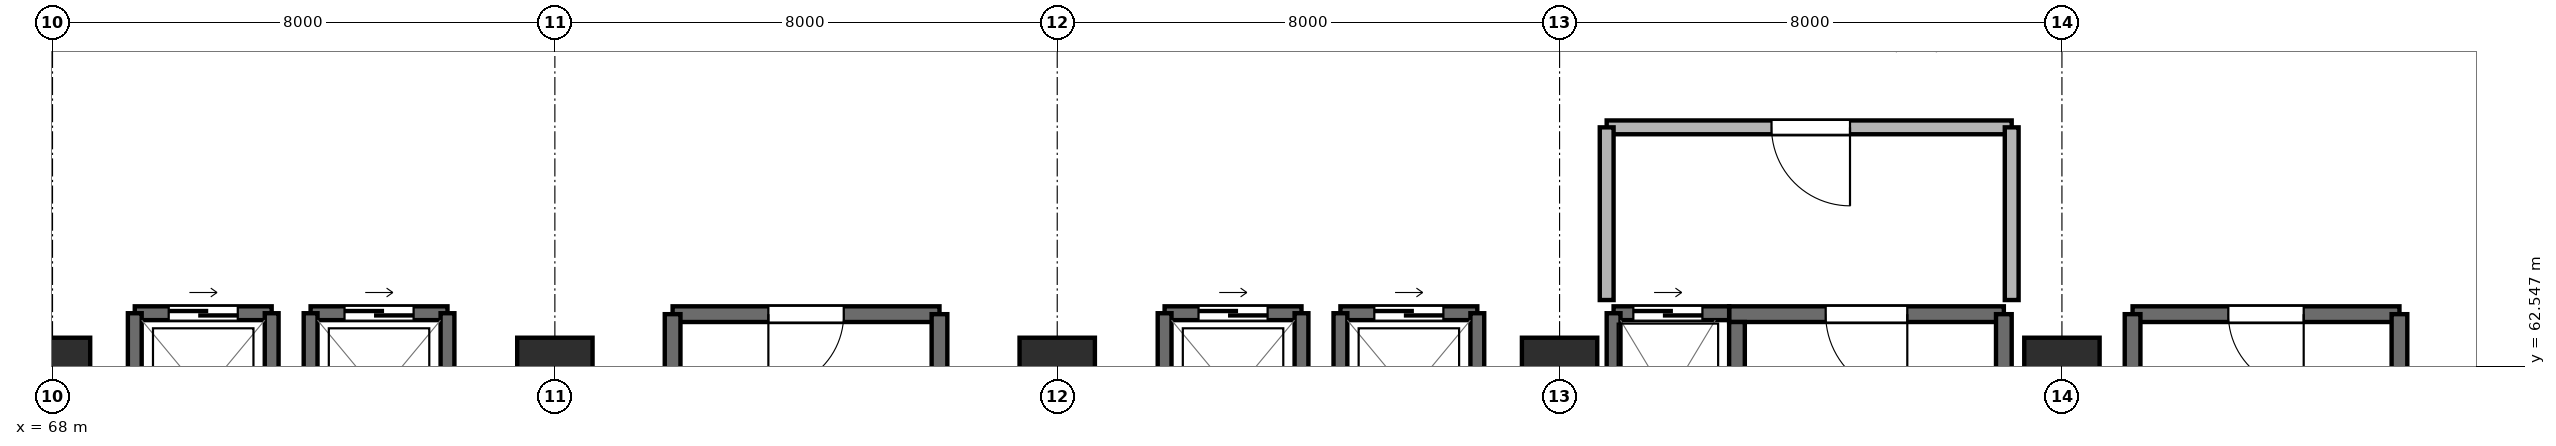
"""IFC4 building model, lengths in metres.
Left out: names, types, materials, properties, quantities, classifications, styles, units other than length and angle.
Written with IfcOpenShell. Run it as: python <this file> out.ifc"""

import sys

from ifc_helpers import new_model, si_unit, direction, frame, frame_2d, origin, origin_2d, place, context, subcontext, project, spatial, rectangle, extrude, element, fill, save


model = new_model("IFC4")
c1 = context("Model", 3, precision=1e-05, world=origin(), true_north=direction((0.0, 1.0)))
c2 = subcontext(c1, "Body", "Model", "MODEL_VIEW")
j1 = project(units=[si_unit("LENGTHUNIT", "METRE"), si_unit("PLANEANGLEUNIT", "RADIAN")], contexts=[c1])
p1 = place(None, origin())
s1 = spatial("IfcSite", under=j1, at=p1, CompositionType="ELEMENT")
p2 = place(p1, origin())
s2 = spatial("IfcBuilding", under=s1, at=p2, CompositionType="ELEMENT")
p3 = place(p2, frame((0.0, 0.0, -9.0)))
s3 = spatial("IfcBuildingStorey", under=s2, at=p3, CompositionType="ELEMENT", Elevation=-9.0)
for number, where, z_axis, x_axis in (
    (1, (68.0, 62.4, 0.0), (0.0, 0.0, 1.0), (1.0, 0.0, 0.0)),
    (2, (76.0, 62.4, 0.0), (0.0, 0.0, 1.0), (1.0, 0.0, 0.0)),
    (3, (84.0, 62.4, 0.0), (0.0, 0.0, 1.0), (1.0, 0.0, 0.0)),
    (4, (92.0, 62.4, 0.0), (0.0, 0.0, 1.0), (1.0, 0.0, 0.0)),
    (5, (100.0, 62.4, 0.0), (0.0, 0.0, 1.0), (1.0, 0.0, 0.0)),
):
    element("IfcColumn", number, at=place(p3, frame(where, z_axis=z_axis, x_axis=x_axis)), inside=s3, PredefinedType="COLUMN", context=c2, shape_type="SweptSolid", body=[
        extrude(rectangle(XDim=1.2, YDim=1.2, at=origin_2d()), origin(), (0.0, 0.0, 1.0), 4.18),
    ])
p4 = place(p3, frame((99.075, 63.375, 0.0), z_axis=(0.0, 0.0, 1.0), x_axis=(-1.0, 0.0, 0.0)))
e6 = element("IfcWall", 6, at=p4, inside=s3, PredefinedType="SHEAR", context=c2, shape_type="SweptSolid", body=[
    extrude(rectangle(XDim=4.375, YDim=0.25, at=frame_2d((2.188, 0.0))), origin(), (0.0, 0.0, 1.0), 4.18),
])
p5 = place(p4, frame((1.538, 0.0, 0.0)))
e7 = element("IfcOpeningElement", 7, at=p5, cuts=e6, PredefinedType="OPENING", context=c2, shape_type="SweptSolid", body=[
    extrude(rectangle(XDim=1.3, YDim=2.2, at=frame_2d((0.65, 1.1))), frame((0.0, 0.137, 0.0), z_axis=(0.0, -1.0, 0.0), x_axis=(1.0, 0.0, 0.0)), (0.0, 0.0, 1.0), 0.274),
])
p6 = place(p3, frame((94.825, 63.25, 0.0), z_axis=(0.0, 0.0, 1.0), x_axis=(0.0, -1.0, 0.0)))
e8 = element("IfcWall", 8, at=p6, inside=s3, PredefinedType="SHEAR", context=c2, shape_type="SweptSolid", body=[
    extrude(rectangle(XDim=7.075, YDim=0.25, at=frame_2d((3.538, 0.0))), origin(), (0.0, 0.0, 1.0), 4.18),
])
p7 = place(p3, frame((99.075, 56.175, 0.0), z_axis=(0.0, 0.0, 1.0), x_axis=(0.0, 1.0, 0.0)))
e9 = element("IfcWall", 9, at=p7, inside=s3, PredefinedType="SHEAR", context=c2, shape_type="SweptSolid", body=[
    extrude(rectangle(XDim=7.2, YDim=0.25, at=frame_2d((3.6, 0.0))), origin(), (0.0, 0.0, 1.0), 4.18),
])
p8 = place(p3, frame((82.125, 63.375, 0.0), z_axis=(0.0, 0.0, 1.0), x_axis=(-1.0, 0.0, 0.0)))
e10 = element("IfcWall", 10, at=p8, inside=s3, PredefinedType="SHEAR", context=c2, shape_type="SweptSolid", body=[
    extrude(rectangle(XDim=4.25, YDim=0.25, at=frame_2d((2.125, 0.0))), origin(), (0.0, 0.0, 1.0), 4.18),
])
p9 = place(p8, frame((1.525, 0.0, 0.0)))
e11 = element("IfcOpeningElement", 11, at=p9, cuts=e10, PredefinedType="OPENING", context=c2, shape_type="SweptSolid", body=[
    extrude(rectangle(XDim=1.2, YDim=2.2, at=frame_2d((0.6, 1.1))), frame((0.0, 0.137, 0.0), z_axis=(0.0, -1.0, 0.0), x_axis=(1.0, 0.0, 0.0)), (0.0, 0.0, 1.0), 0.274),
])
for number, where, z_axis, x_axis in (
    (12, (77.875, 63.375, 0.0), (0.0, 0.0, 1.0), (0.0, -1.0, 0.0)),
    (13, (82.125, 56.175, 0.0), (0.0, 0.0, 1.0), (0.0, 1.0, 0.0)),
):
    element("IfcWall", number, at=place(p3, frame(where, z_axis=z_axis, x_axis=x_axis)), inside=s3, PredefinedType="SHEAR", context=c2, shape_type="SweptSolid", body=[
        extrude(rectangle(XDim=7.2, YDim=0.25, at=frame_2d((3.6, 0.0))), origin(), (0.0, 0.0, 1.0), 4.18),
    ])
p10 = place(p3, frame((105.375, 63.375, 0.0), z_axis=(0.0, 0.0, 1.0), x_axis=(-1.0, 0.0, 0.0)))
e14 = element("IfcWall", 14, at=p10, inside=s3, PredefinedType="SHEAR", context=c2, shape_type="SweptSolid", body=[
    extrude(rectangle(XDim=4.25, YDim=0.25, at=frame_2d((2.125, 0.0))), origin(), (0.0, 0.0, 1.0), 4.18),
])
p11 = place(p10, frame((1.525, 0.0, 0.0)))
e15 = element("IfcOpeningElement", 15, at=p11, cuts=e14, PredefinedType="OPENING", context=c2, shape_type="SweptSolid", body=[
    extrude(rectangle(XDim=1.2, YDim=2.2, at=frame_2d((0.6, 1.1))), frame((0.0, 0.137, 0.0), z_axis=(0.0, -1.0, 0.0), x_axis=(1.0, 0.0, 0.0)), (0.0, 0.0, 1.0), 0.274),
])
for number, where, z_axis, x_axis in (
    (16, (101.125, 63.375, 0.0), (0.0, 0.0, 1.0), (0.0, -1.0, 0.0)),
    (17, (105.375, 56.175, 0.0), (0.0, 0.0, 1.0), (0.0, 1.0, 0.0)),
):
    element("IfcWall", number, at=place(p3, frame(where, z_axis=z_axis, x_axis=x_axis)), inside=s3, PredefinedType="SHEAR", context=c2, shape_type="SweptSolid", body=[
        extrude(rectangle(XDim=7.2, YDim=0.25, at=frame_2d((3.6, 0.0))), origin(), (0.0, 0.0, 1.0), 4.18),
    ])
p12 = place(p3, frame((94.7, 63.39, 0.0), z_axis=(0.0, 0.0, 1.0), x_axis=(-1.0, 0.0, 0.0)))
e18 = element("IfcWall", 18, at=p12, inside=s3, PredefinedType="SHEAR", context=c2, shape_type="SweptSolid", body=[
    extrude(rectangle(XDim=1.84, YDim=0.22, at=frame_2d((0.92, 0.0))), origin(), (0.0, 0.0, 1.0), 4.18),
])
p13 = place(p12, frame((0.425, 0.0, 0.0)))
e19 = element("IfcOpeningElement", 19, at=p13, cuts=e18, PredefinedType="OPENING", context=c2, shape_type="SweptSolid", body=[
    extrude(rectangle(XDim=1.1, YDim=2.2, at=frame_2d((0.55, 1.1))), frame((0.0, 0.122, 0.0), z_axis=(0.0, -1.0, 0.0), x_axis=(1.0, 0.0, 0.0)), (0.0, 0.0, 1.0), 0.244),
])
p14 = place(p3, frame((92.86, 63.39, 0.0), z_axis=(0.0, 0.0, 1.0), x_axis=(0.0, -1.0, 0.0)))
e20 = element("IfcWall", 20, at=p14, inside=s3, PredefinedType="SHEAR", context=c2, shape_type="SweptSolid", body=[
    extrude(rectangle(XDim=2.73, YDim=0.22, at=frame_2d((1.365, 0.0))), origin(), (0.0, 0.0, 1.0), 4.18),
])
p15 = place(p3, frame((71.49, 63.39, 0.0), z_axis=(0.0, 0.0, 1.0), x_axis=(-1.0, 0.0, 0.0)))
e21 = element("IfcWall", 21, at=p15, inside=s3, PredefinedType="SHEAR", context=c2, shape_type="SweptSolid", body=[
    extrude(rectangle(XDim=2.18, YDim=0.22, at=frame_2d((1.09, 0.0))), origin(), (0.0, 0.0, 1.0), 4.18),
])
p16 = place(p15, frame((0.54, 0.0, 0.0)))
e22 = element("IfcOpeningElement", 22, at=p16, cuts=e21, PredefinedType="OPENING", context=c2, shape_type="SweptSolid", body=[
    extrude(rectangle(XDim=1.1, YDim=2.2, at=frame_2d((0.55, 1.1))), frame((0.0, 0.122, 0.0), z_axis=(0.0, -1.0, 0.0), x_axis=(1.0, 0.0, 0.0)), (0.0, 0.0, 1.0), 0.244),
])
for number, where, z_axis, x_axis in (
    (23, (69.31, 63.39, 0.0), (0.0, 0.0, 1.0), (0.0, -1.0, 0.0)),
    (24, (71.49, 60.81, 0.0), (0.0, 0.0, 1.0), (0.0, 1.0, 0.0)),
):
    element("IfcWall", number, at=place(p3, frame(where, z_axis=z_axis, x_axis=x_axis)), inside=s3, PredefinedType="SHEAR", context=c2, shape_type="SweptSolid", body=[
        extrude(rectangle(XDim=2.58, YDim=0.22, at=frame_2d((1.29, 0.0))), origin(), (0.0, 0.0, 1.0), 4.18),
    ])
p17 = place(p3, frame((74.29, 63.39, 0.0), z_axis=(0.0, 0.0, 1.0), x_axis=(-1.0, 0.0, 0.0)))
e25 = element("IfcWall", 25, at=p17, inside=s3, PredefinedType="SHEAR", context=c2, shape_type="SweptSolid", body=[
    extrude(rectangle(XDim=2.18, YDim=0.22, at=frame_2d((1.09, 0.0))), origin(), (0.0, 0.0, 1.0), 4.18),
])
p18 = place(p17, frame((0.54, 0.0, 0.0)))
e26 = element("IfcOpeningElement", 26, at=p18, cuts=e25, PredefinedType="OPENING", context=c2, shape_type="SweptSolid", body=[
    extrude(rectangle(XDim=1.1, YDim=2.2, at=frame_2d((0.55, 1.1))), frame((0.0, 0.122, 0.0), z_axis=(0.0, -1.0, 0.0), x_axis=(1.0, 0.0, 0.0)), (0.0, 0.0, 1.0), 0.244),
])
for number, where, z_axis, x_axis in (
    (27, (72.11, 63.39, 0.0), (0.0, 0.0, 1.0), (0.0, -1.0, 0.0)),
    (28, (74.29, 60.81, 0.0), (0.0, 0.0, 1.0), (0.0, 1.0, 0.0)),
):
    element("IfcWall", number, at=place(p3, frame(where, z_axis=z_axis, x_axis=x_axis)), inside=s3, PredefinedType="SHEAR", context=c2, shape_type="SweptSolid", body=[
        extrude(rectangle(XDim=2.58, YDim=0.22, at=frame_2d((1.29, 0.0))), origin(), (0.0, 0.0, 1.0), 4.18),
    ])
p19 = place(p3, frame((87.89, 63.39, 0.0), z_axis=(0.0, 0.0, 1.0), x_axis=(-1.0, 0.0, 0.0)))
e29 = element("IfcWall", 29, at=p19, inside=s3, PredefinedType="SHEAR", context=c2, shape_type="SweptSolid", body=[
    extrude(rectangle(XDim=2.18, YDim=0.22, at=frame_2d((1.09, 0.0))), origin(), (0.0, 0.0, 1.0), 4.18),
])
p20 = place(p19, frame((0.54, 0.0, 0.0)))
e30 = element("IfcOpeningElement", 30, at=p20, cuts=e29, PredefinedType="OPENING", context=c2, shape_type="SweptSolid", body=[
    extrude(rectangle(XDim=1.1, YDim=2.2, at=frame_2d((0.55, 1.1))), frame((0.0, 0.122, 0.0), z_axis=(0.0, -1.0, 0.0), x_axis=(1.0, 0.0, 0.0)), (0.0, 0.0, 1.0), 0.244),
])
for number, where, z_axis, x_axis in (
    (31, (85.71, 63.39, 0.0), (0.0, 0.0, 1.0), (0.0, -1.0, 0.0)),
    (32, (87.89, 60.81, 0.0), (0.0, 0.0, 1.0), (0.0, 1.0, 0.0)),
):
    element("IfcWall", number, at=place(p3, frame(where, z_axis=z_axis, x_axis=x_axis)), inside=s3, PredefinedType="SHEAR", context=c2, shape_type="SweptSolid", body=[
        extrude(rectangle(XDim=2.58, YDim=0.22, at=frame_2d((1.29, 0.0))), origin(), (0.0, 0.0, 1.0), 4.18),
    ])
p21 = place(p3, frame((90.69, 63.39, 0.0), z_axis=(0.0, 0.0, 1.0), x_axis=(-1.0, 0.0, 0.0)))
e33 = element("IfcWall", 33, at=p21, inside=s3, PredefinedType="SHEAR", context=c2, shape_type="SweptSolid", body=[
    extrude(rectangle(XDim=2.18, YDim=0.22, at=frame_2d((1.09, 0.0))), origin(), (0.0, 0.0, 1.0), 4.18),
])
p22 = place(p21, frame((0.54, 0.0, 0.0)))
e34 = element("IfcOpeningElement", 34, at=p22, cuts=e33, PredefinedType="OPENING", context=c2, shape_type="SweptSolid", body=[
    extrude(rectangle(XDim=1.1, YDim=2.2, at=frame_2d((0.55, 1.1))), frame((0.0, 0.122, 0.0), z_axis=(0.0, -1.0, 0.0), x_axis=(1.0, 0.0, 0.0)), (0.0, 0.0, 1.0), 0.244),
])
for number, where, z_axis, x_axis in (
    (35, (88.51, 63.39, 0.0), (0.0, 0.0, 1.0), (0.0, -1.0, 0.0)),
    (36, (90.69, 60.81, 0.0), (0.0, 0.0, 1.0), (0.0, 1.0, 0.0)),
):
    element("IfcWall", number, at=place(p3, frame(where, z_axis=z_axis, x_axis=x_axis)), inside=s3, PredefinedType="SHEAR", context=c2, shape_type="SweptSolid", body=[
        extrude(rectangle(XDim=2.58, YDim=0.22, at=frame_2d((1.29, 0.0))), origin(), (0.0, 0.0, 1.0), 4.18),
    ])
p23 = place(p3, frame((92.75, 66.35, 0.0), z_axis=(0.0, 0.0, 1.0), x_axis=(1.0, 0.0, 0.0)))
e37 = element("IfcWall", 37, at=p23, inside=s3, PredefinedType="PARTITIONING", context=c2, shape_type="SweptSolid", body=[
    extrude(rectangle(XDim=6.45, YDim=0.22, at=frame_2d((3.225, 0.0))), origin(), (0.0, 0.0, 1.0), 3.78),
])
p24 = place(p23, frame((2.625, 0.0, 0.0)))
e38 = element("IfcOpeningElement", 38, at=p24, cuts=e37, PredefinedType="OPENING", context=c2, shape_type="SweptSolid", body=[
    extrude(rectangle(XDim=1.25, YDim=2.2, at=frame_2d((0.625, 1.1))), frame((0.0, 0.122, 0.0), z_axis=(0.0, -1.0, 0.0), x_axis=(1.0, 0.0, 0.0)), (0.0, 0.0, 1.0), 0.244),
])
for number, where, z_axis, x_axis in (
    (39, (92.75, 63.6, 0.0), (0.0, 0.0, 1.0), (0.0, 1.0, 0.0)),
    (40, (99.2, 63.6, 0.0), (0.0, 0.0, 1.0), (0.0, 1.0, 0.0)),
):
    element("IfcWall", number, at=place(p3, frame(where, z_axis=z_axis, x_axis=x_axis)), inside=s3, PredefinedType="PARTITIONING", context=c2, shape_type="SweptSolid", body=[
        extrude(rectangle(XDim=2.75, YDim=0.22, at=frame_2d((1.375, 0.0))), origin(), (0.0, 0.0, 1.0), 3.78),
    ])
p25 = place(p5, origin())
e41 = element("IfcDoor", 41, at=p25, inside=s3, OperationType="SINGLE_SWING_LEFT", PredefinedType="DOOR", context=c2, shape_type="SweptSolid", body=[
    extrude(rectangle(XDim=1.3, YDim=2.2, at=frame_2d((0.65, 1.1))), frame((0.0, 0.025, 0.0), z_axis=(0.0, -1.0, 0.0), x_axis=(1.0, 0.0, 0.0)), (0.0, 0.0, 1.0), 0.05),
])
fill(e7, e41)
p26 = place(p9, origin())
e42 = element("IfcDoor", 42, at=p26, inside=s3, OperationType="SINGLE_SWING_RIGHT", PredefinedType="DOOR", context=c2, shape_type="SweptSolid", body=[
    extrude(rectangle(XDim=1.2, YDim=2.2, at=frame_2d((0.6, 1.1))), frame((0.0, 0.025, 0.0), z_axis=(0.0, -1.0, 0.0), x_axis=(1.0, 0.0, 0.0)), (0.0, 0.0, 1.0), 0.05),
])
fill(e11, e42)
p27 = place(p11, origin())
e43 = element("IfcDoor", 43, at=p27, inside=s3, OperationType="SINGLE_SWING_LEFT", PredefinedType="DOOR", context=c2, shape_type="SweptSolid", body=[
    extrude(rectangle(XDim=1.2, YDim=2.2, at=frame_2d((0.6, 1.1))), frame((0.0, 0.025, 0.0), z_axis=(0.0, -1.0, 0.0), x_axis=(1.0, 0.0, 0.0)), (0.0, 0.0, 1.0), 0.05),
])
fill(e15, e43)
p28 = place(p13, origin())
e44 = element("IfcDoor", 44, at=p28, inside=s3, OperationType="SLIDING_TO_LEFT", PredefinedType="DOOR", context=c2, shape_type="SweptSolid", body=[
    extrude(rectangle(XDim=1.1, YDim=2.2, at=frame_2d((0.55, 1.1))), frame((0.0, 0.025, 0.0), z_axis=(0.0, -1.0, 0.0), x_axis=(1.0, 0.0, 0.0)), (0.0, 0.0, 1.0), 0.05),
])
fill(e19, e44)
p29 = place(p16, origin())
e45 = element("IfcDoor", 45, at=p29, inside=s3, OperationType="SLIDING_TO_LEFT", PredefinedType="DOOR", context=c2, shape_type="SweptSolid", body=[
    extrude(rectangle(XDim=1.1, YDim=2.2, at=frame_2d((0.55, 1.1))), frame((0.0, 0.025, 0.0), z_axis=(0.0, -1.0, 0.0), x_axis=(1.0, 0.0, 0.0)), (0.0, 0.0, 1.0), 0.05),
])
fill(e22, e45)
p30 = place(p18, origin())
e46 = element("IfcDoor", 46, at=p30, inside=s3, OperationType="SLIDING_TO_LEFT", PredefinedType="DOOR", context=c2, shape_type="SweptSolid", body=[
    extrude(rectangle(XDim=1.1, YDim=2.2, at=frame_2d((0.55, 1.1))), frame((0.0, 0.025, 0.0), z_axis=(0.0, -1.0, 0.0), x_axis=(1.0, 0.0, 0.0)), (0.0, 0.0, 1.0), 0.05),
])
fill(e26, e46)
p31 = place(p20, origin())
e47 = element("IfcDoor", 47, at=p31, inside=s3, OperationType="SLIDING_TO_LEFT", PredefinedType="DOOR", context=c2, shape_type="SweptSolid", body=[
    extrude(rectangle(XDim=1.1, YDim=2.2, at=frame_2d((0.55, 1.1))), frame((0.0, 0.025, 0.0), z_axis=(0.0, -1.0, 0.0), x_axis=(1.0, 0.0, 0.0)), (0.0, 0.0, 1.0), 0.05),
])
fill(e30, e47)
p32 = place(p22, origin())
e48 = element("IfcDoor", 48, at=p32, inside=s3, OperationType="SLIDING_TO_LEFT", PredefinedType="DOOR", context=c2, shape_type="SweptSolid", body=[
    extrude(rectangle(XDim=1.1, YDim=2.2, at=frame_2d((0.55, 1.1))), frame((0.0, 0.025, 0.0), z_axis=(0.0, -1.0, 0.0), x_axis=(1.0, 0.0, 0.0)), (0.0, 0.0, 1.0), 0.05),
])
fill(e34, e48)
p33 = place(p24, frame((1.25, 0.0, 0.0), z_axis=(0.0, 0.0, 1.0), x_axis=(-1.0, 0.0, 0.0)))
e49 = element("IfcDoor", 49, at=p33, inside=s3, OperationType="SINGLE_SWING_RIGHT", PredefinedType="DOOR", context=c2, shape_type="SweptSolid", body=[
    extrude(rectangle(XDim=1.25, YDim=2.2, at=frame_2d((0.625, 1.1))), frame((0.0, 0.025, 0.0), z_axis=(0.0, -1.0, 0.0), x_axis=(1.0, 0.0, 0.0)), (0.0, 0.0, 1.0), 0.05),
])
fill(e38, e49)
save(model, sys.argv[1])
